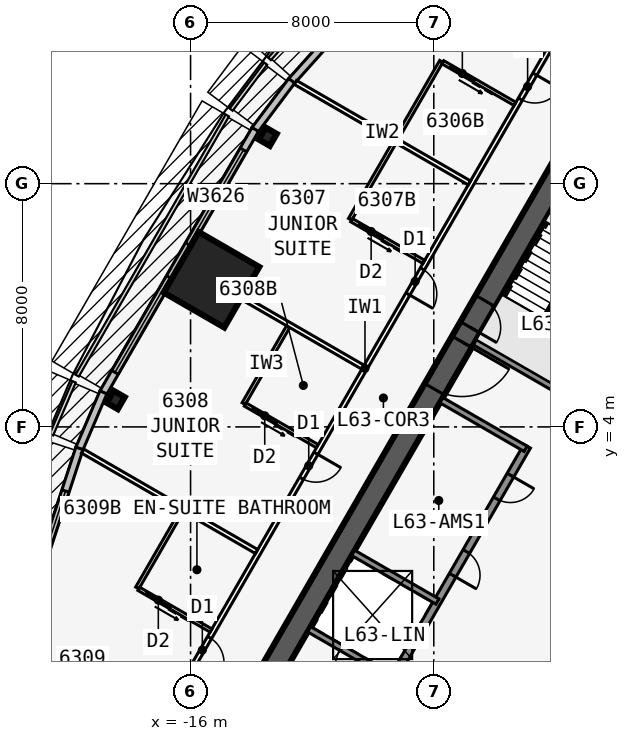
"""IFC4 building model, lengths in metres.
Left out: names, types, materials, properties, quantities, classifications, styles, units other than length and angle.
Written with IfcOpenShell. Run it as: python <this file> out.ifc"""

import sys

from ifc_helpers import new_model, si_unit, direction, frame, frame_2d, origin, origin_2d, place, context, subcontext, project, spatial, rectangle, i_section, extrude, element, fill, save


model = new_model("IFC4")
c1 = context("Model", 3, precision=1e-05, world=origin(), true_north=direction((0.0, 1.0)))
c2 = subcontext(c1, "Body", "Model", "MODEL_VIEW")
j1 = project(units=[si_unit("LENGTHUNIT", "METRE"), si_unit("PLANEANGLEUNIT", "RADIAN")], contexts=[c1])
p1 = place(None, origin())
s1 = spatial("IfcSite", under=j1, at=p1, CompositionType="ELEMENT")
p2 = place(p1, origin())
s2 = spatial("IfcBuilding", under=s1, at=p2, CompositionType="ELEMENT")
p3 = place(p2, frame((0.0, 0.0, 239.3)))
s3 = spatial("IfcBuildingStorey", under=s2, at=p3, CompositionType="ELEMENT", Elevation=239.3)
p4 = place(p3, frame((0.0, 19.052, 0.0), z_axis=(0.0, 0.0, 1.0), x_axis=(-0.499999749417, -0.866025548458, 0.0)))
e1 = element("IfcWall", 1, at=p4, inside=s3, PredefinedType="SHEAR", context=c2, shape_type="SweptSolid", body=[
    extrude(rectangle(XDim=33.0, YDim=0.75, at=frame_2d((16.5, 0.0))), origin(), (0.0, 0.0, 1.0), 3.6),
])
p5 = place(p4, frame((14.15, 0.0, 0.0)))
e2 = element("IfcOpeningElement", 2, at=p5, cuts=e1, PredefinedType="OPENING", context=c2, shape_type="SweptSolid", body=[
    extrude(rectangle(XDim=1.8, YDim=2.13, at=frame_2d((0.9, 1.065))), frame((0.0, 0.385, 0.0), z_axis=(0.0, -1.0, 0.0), x_axis=(1.0, 0.0, 0.0)), (0.0, 0.0, 1.0), 0.77),
])
p6 = place(p4, frame((12.6, 0.0, 0.0)))
e3 = element("IfcOpeningElement", 3, at=p6, cuts=e1, PredefinedType="OPENING", context=c2, shape_type="SweptSolid", body=[
    extrude(rectangle(XDim=1.0, YDim=2.13, at=frame_2d((0.5, 1.065))), frame((0.0, 0.385, 0.0), z_axis=(0.0, -1.0, 0.0), x_axis=(1.0, 0.0, 0.0)), (0.0, 0.0, 1.0), 0.77),
])
p7 = place(p3, frame((-4.929, 3.365, 0.0), z_axis=(0.0, 0.0, 1.0), x_axis=(-0.499991433582, -0.866030349552, 0.0)))
e4 = element("IfcWall", 4, at=p7, inside=s3, PredefinedType="SOLIDWALL", context=c2, shape_type="SweptSolid", body=[
    extrude(rectangle(XDim=10.633, YDim=0.25, at=frame_2d((5.316, 0.0))), origin(), (0.0, 0.0, 1.0), 3.435),
])
p8 = place(p7, frame((9.164, 0.0, 0.0)))
e5 = element("IfcOpeningElement", 5, at=p8, cuts=e4, PredefinedType="OPENING", context=c2, shape_type="SweptSolid", body=[
    extrude(rectangle(XDim=0.9, YDim=2.13, at=frame_2d((0.45, 1.065))), frame((0.0, 0.135, 0.0), z_axis=(0.0, -1.0, 0.0), x_axis=(1.0, 0.0, 0.0)), (0.0, 0.0, 1.0), 0.27),
])
p9 = place(p7, frame((1.1, 0.0, 0.0)))
e6 = element("IfcOpeningElement", 6, at=p9, cuts=e4, PredefinedType="OPENING", context=c2, shape_type="SweptSolid", body=[
    extrude(rectangle(XDim=0.9, YDim=2.13, at=frame_2d((0.45, 1.065))), frame((0.0, 0.135, 0.0), z_axis=(0.0, -1.0, 0.0), x_axis=(1.0, 0.0, 0.0)), (0.0, 0.0, 1.0), 0.27),
])
p10 = place(p7, frame((4.0, 0.0, 0.0)))
e7 = element("IfcOpeningElement", 7, at=p10, cuts=e4, PredefinedType="OPENING", context=c2, shape_type="SweptSolid", body=[
    extrude(rectangle(XDim=0.9, YDim=2.13, at=frame_2d((0.45, 1.065))), frame((0.0, 0.135, 0.0), z_axis=(0.0, -1.0, 0.0), x_axis=(1.0, 0.0, 0.0)), (0.0, 0.0, 1.0), 0.27),
])
for number, where, z_axis, x_axis in (
    (8, (-3.879, 5.184, 0.0), (0.0, 0.0, 1.0), (-0.866, 0.5, 0.0)),
    (9, (-4.979, 3.279, 0.0), (0.0, 0.0, 1.0), (-0.866, 0.5, 0.0)),
    (10, (-7.879, -1.744, 0.0), (0.0, 0.0, 1.0), (-0.866, 0.5, 0.0)),
):
    element("IfcWall", number, at=place(p3, frame(where, z_axis=z_axis, x_axis=x_axis)), inside=s3, PredefinedType="SOLIDWALL", context=c2, shape_type="SweptSolid", body=[
        extrude(rectangle(XDim=3.2, YDim=0.2, at=frame_2d((1.6, 0.0))), origin(), (0.0, 0.0, 1.0), 3.435),
    ])
p11 = place(p3, frame((-9.329, -4.256, 0.0), z_axis=(0.0, 0.0, 1.0), x_axis=(-0.866022944154, 0.50000426018, 0.0)))
e11 = element("IfcWall", 11, at=p11, inside=s3, PredefinedType="SOLIDWALL", context=c2, shape_type="SweptSolid", body=[
    extrude(rectangle(XDim=3.2, YDim=0.2, at=frame_2d((1.6, 0.0))), origin(), (0.0, 0.0, 1.0), 3.435),
])
for number, where, z_axis, x_axis in (
    (12, (-13.461, 13.545, 0.0), (0.0, 0.0, 1.0), (-0.866, 0.5, 0.0)),
    (13, (-18.461, 4.885, 0.0), (0.0, 0.0, 1.0), (-0.866, 0.5, 0.0)),
):
    element("IfcColumn", number, at=place(p3, frame(where, z_axis=z_axis, x_axis=x_axis)), inside=s3, PredefinedType="COLUMN", context=c2, shape_type="SweptSolid", body=[
        extrude(i_section(OverallWidth=0.419, OverallDepth=0.455, WebThickness=0.042, FlangeThickness=0.068, at=origin_2d()), origin(), (0.0, 0.0, 1.0), 3.6),
    ])
p12 = place(p3, frame((-15.312, 8.84, 0.0), z_axis=(0.0, 0.0, 1.0), x_axis=(-0.866025403784, 0.5, 0.0)))
e14 = element("IfcColumn", 14, at=p12, inside=s3, PredefinedType="COLUMN", context=c2, shape_type="SweptSolid", body=[
    extrude(rectangle(XDim=2.3, YDim=2.3, at=origin_2d()), origin(), (0.0, 0.0, 1.0), 3.6),
])
p13 = place(p3, frame((-7.907, 20.701, 0.0), z_axis=(0.0, 0.0, 1.0), x_axis=(-0.667303550892, -0.744785855778, 0.0)))
e15 = element("IfcWall", 15, at=p13, inside=s3, PredefinedType="STANDARD", context=c2, shape_type="SweptSolid", body=[
    extrude(rectangle(XDim=7.153, YDim=0.25, at=frame_2d((3.576, 0.0))), origin(), (0.0, 0.0, 1.0), 3.435),
])
p14 = place(p13, frame((1.476, 0.0, 0.45)))
e16 = element("IfcOpeningElement", 16, at=p14, cuts=e15, PredefinedType="OPENING", context=c2, shape_type="SweptSolid", body=[
    extrude(rectangle(XDim=4.2, YDim=2.6, at=frame_2d((2.1, 1.3))), frame((0.0, 0.135, 0.0), z_axis=(0.0, -1.0, 0.0), x_axis=(1.0, 0.0, 0.0)), (0.0, 0.0, 1.0), 0.27),
])
p15 = place(p3, frame((-12.673, 15.382, 0.0), z_axis=(0.0, 0.0, 1.0), x_axis=(-0.599650843534, -0.800261748335, 0.0)))
e17 = element("IfcWall", 17, at=p15, inside=s3, PredefinedType="STANDARD", context=c2, shape_type="SweptSolid", body=[
    extrude(rectangle(XDim=2.014, YDim=0.25, at=frame_2d((1.007, 0.0))), origin(), (0.0, 0.0, 1.0), 3.435),
])
p16 = place(p3, frame((-13.873, 13.783, 0.0), z_axis=(0.0, 0.0, 1.0), x_axis=(-0.499993662806, -0.866029062534, 0.0)))
e18 = element("IfcWall", 18, at=p16, inside=s3, PredefinedType="STANDARD", context=c2, shape_type="SweptSolid", body=[
    extrude(rectangle(XDim=10.0, YDim=0.25, at=frame_2d((5.0, 0.0))), origin(), (0.0, 0.0, 1.0), 3.435),
])
p17 = place(p16, frame((0.775, 0.0, 0.45)))
e19 = element("IfcOpeningElement", 19, at=p17, cuts=e18, PredefinedType="OPENING", context=c2, shape_type="SweptSolid", body=[
    extrude(rectangle(XDim=3.6, YDim=2.6, at=frame_2d((1.8, 1.3))), frame((0.0, 0.135, 0.0), z_axis=(0.0, -1.0, 0.0), x_axis=(1.0, 0.0, 0.0)), (0.0, 0.0, 1.0), 0.27),
])
p18 = place(p16, frame((5.625, 0.0, 0.45)))
e20 = element("IfcOpeningElement", 20, at=p18, cuts=e18, PredefinedType="OPENING", context=c2, shape_type="SweptSolid", body=[
    extrude(rectangle(XDim=3.6, YDim=2.6, at=frame_2d((1.8, 1.3))), frame((0.0, 0.135, 0.0), z_axis=(0.0, -1.0, 0.0), x_axis=(1.0, 0.0, 0.0)), (0.0, 0.0, 1.0), 0.27),
])
p19 = place(p3, frame((-18.866, 5.136, 0.0), z_axis=(0.0, 0.0, 1.0), x_axis=(-0.393290226175, -0.91941437774, 0.0)))
e21 = element("IfcWall", 21, at=p19, inside=s3, PredefinedType="STANDARD", context=c2, shape_type="SweptSolid", body=[
    extrude(rectangle(XDim=2.014, YDim=0.25, at=frame_2d((1.007, 0.0))), origin(), (0.0, 0.0, 1.0), 3.435),
])
p20 = place(p3, frame((-19.654, 3.294, 0.0), z_axis=(0.0, 0.0, 1.0), x_axis=(-0.311328857048, -0.95030223759, 0.0)))
e22 = element("IfcWall", 22, at=p20, inside=s3, PredefinedType="STANDARD", context=c2, shape_type="SweptSolid", body=[
    extrude(rectangle(XDim=7.153, YDim=0.25, at=frame_2d((3.576, 0.0))), origin(), (0.0, 0.0, 1.0), 3.435),
])
p21 = place(p20, frame((1.476, 0.0, 0.45)))
e23 = element("IfcOpeningElement", 23, at=p21, cuts=e22, PredefinedType="OPENING", context=c2, shape_type="SweptSolid", body=[
    extrude(rectangle(XDim=4.2, YDim=2.6, at=frame_2d((2.1, 1.3))), frame((0.0, 0.135, 0.0), z_axis=(0.0, -1.0, 0.0), x_axis=(1.0, 0.0, 0.0)), (0.0, 0.0, 1.0), 0.27),
])
p22 = place(p3, frame((-0.425, 22.966, 0.0), z_axis=(0.0, 0.0, 1.0), x_axis=(-0.500000265775, -0.866025250339, 0.0)))
e24 = element("IfcWall", 24, at=p22, inside=s3, PredefinedType="PARTITIONING", context=c2, shape_type="SweptSolid", body=[
    extrude(rectangle(XDim=39.354, YDim=0.15, at=frame_2d((19.677, 0.0))), origin(), (0.0, 0.0, 1.0), 3.435),
])
p23 = place(p22, frame((8.502, 0.0, 0.0)))
e25 = element("IfcOpeningElement", 25, at=p23, cuts=e24, PredefinedType="OPENING", context=c2, shape_type="SweptSolid", body=[
    extrude(rectangle(XDim=0.95, YDim=2.13, at=frame_2d((0.475, 1.065))), frame((0.0, 0.085, 0.0), z_axis=(0.0, -1.0, 0.0), x_axis=(1.0, 0.0, 0.0)), (0.0, 0.0, 1.0), 0.17),
])
p24 = place(p22, frame((15.902, 0.0, 0.0)))
e26 = element("IfcOpeningElement", 26, at=p24, cuts=e24, PredefinedType="OPENING", context=c2, shape_type="SweptSolid", body=[
    extrude(rectangle(XDim=0.95, YDim=2.13, at=frame_2d((0.475, 1.065))), frame((0.0, 0.085, 0.0), z_axis=(0.0, -1.0, 0.0), x_axis=(1.0, 0.0, 0.0)), (0.0, 0.0, 1.0), 0.17),
])
p25 = place(p22, frame((22.902, 0.0, 0.0)))
e27 = element("IfcOpeningElement", 27, at=p25, cuts=e24, PredefinedType="OPENING", context=c2, shape_type="SweptSolid", body=[
    extrude(rectangle(XDim=0.95, YDim=2.13, at=frame_2d((0.475, 1.065))), frame((0.0, 0.085, 0.0), z_axis=(0.0, -1.0, 0.0), x_axis=(1.0, 0.0, 0.0)), (0.0, 0.0, 1.0), 0.17),
])
p26 = place(p22, frame((29.902, 0.0, 0.0)))
e28 = element("IfcOpeningElement", 28, at=p26, cuts=e24, PredefinedType="OPENING", context=c2, shape_type="SweptSolid", body=[
    extrude(rectangle(XDim=0.95, YDim=2.13, at=frame_2d((0.475, 1.065))), frame((0.0, 0.085, 0.0), z_axis=(0.0, -1.0, 0.0), x_axis=(1.0, 0.0, 0.0)), (0.0, 0.0, 1.0), 0.17),
])
p27 = place(p3, frame((-6.829, 12.025, 0.0), z_axis=(0.0, 0.0, 1.0), x_axis=(-0.866029323189, 0.499993211332, 0.0)))
e29 = element("IfcWall", 29, at=p27, inside=s3, PredefinedType="PARTITIONING", context=c2, shape_type="SweptSolid", body=[
    extrude(rectangle(XDim=6.608, YDim=0.15, at=frame_2d((3.304, 0.0))), origin(), (0.0, 0.0, 1.0), 2.678),
])
p28 = place(p3, frame((-10.329, 5.963, 0.0), z_axis=(0.0, 0.0, 1.0), x_axis=(-0.866011785882, 0.500023586156, 0.0)))
e30 = element("IfcWall", 30, at=p28, inside=s3, PredefinedType="PARTITIONING", context=c2, shape_type="SweptSolid", body=[
    extrude(rectangle(XDim=6.854, YDim=0.15, at=frame_2d((3.427, 0.0))), origin(), (0.0, 0.0, 1.0), 2.678),
])
p29 = place(p3, frame((-13.829, -0.099, 0.0), z_axis=(0.0, 0.0, 1.0), x_axis=(-0.866022562216, 0.500004921708, 0.0)))
e31 = element("IfcWall", 31, at=p29, inside=s3, PredefinedType="PARTITIONING", context=c2, shape_type="SweptSolid", body=[
    extrude(rectangle(XDim=6.609, YDim=0.15, at=frame_2d((3.304, 0.0))), origin(), (0.0, 0.0, 1.0), 2.678),
])
p30 = place(p3, frame((-7.753, 16.023, 0.0), z_axis=(0.0, 0.0, 1.0), x_axis=(-0.499990139034, -0.866031096941, 0.0)))
e32 = element("IfcWall", 32, at=p30, inside=s3, PredefinedType="PLUMBINGWALL", context=c2, shape_type="SweptSolid", body=[
    extrude(rectangle(XDim=3.0, YDim=0.12, at=frame_2d((1.5, 0.0))), origin(), (0.0, 0.0, 1.0), 3.435),
])
p31 = place(p3, frame((-5.329, 14.623, 0.0), z_axis=(0.0, 0.0, 1.0), x_axis=(-0.865997131366, 0.500048966069, 0.0)))
e33 = element("IfcWall", 33, at=p31, inside=s3, PredefinedType="PLUMBINGWALL", context=c2, shape_type="SweptSolid", body=[
    extrude(rectangle(XDim=2.74, YDim=0.12, at=frame_2d((1.37, 0.0))), origin(), (0.0, 0.0, 1.0), 3.435),
])
p32 = place(p31, frame((1.55, 0.0, 0.0)))
e34 = element("IfcOpeningElement", 34, at=p32, cuts=e33, PredefinedType="OPENING", context=c2, shape_type="SweptSolid", body=[
    extrude(rectangle(XDim=0.9, YDim=2.13, at=frame_2d((0.45, 1.065))), frame((0.0, 0.07, 0.0), z_axis=(0.0, -1.0, 0.0), x_axis=(1.0, 0.0, 0.0)), (0.0, 0.0, 1.0), 0.14),
])
p33 = place(p3, frame((-9.253, 13.425, 0.0), z_axis=(0.0, 0.0, 1.0), x_axis=(-0.499990139034, -0.866031096941, 0.0)))
e35 = element("IfcWall", 35, at=p33, inside=s3, PredefinedType="PLUMBINGWALL", context=c2, shape_type="SweptSolid", body=[
    extrude(rectangle(XDim=3.0, YDim=0.12, at=frame_2d((1.5, 0.0))), origin(), (0.0, 0.0, 1.0), 3.435),
])
p34 = place(p3, frame((-8.329, 9.427, 0.0), z_axis=(0.0, 0.0, 1.0), x_axis=(-0.866035715982, 0.499982138324, 0.0)))
e36 = element("IfcWall", 36, at=p34, inside=s3, PredefinedType="PLUMBINGWALL", context=c2, shape_type="SweptSolid", body=[
    extrude(rectangle(XDim=2.74, YDim=0.12, at=frame_2d((1.37, 0.0))), origin(), (0.0, 0.0, 1.0), 3.435),
])
p35 = place(p34, frame((1.55, 0.0, 0.0)))
e37 = element("IfcOpeningElement", 37, at=p35, cuts=e36, PredefinedType="OPENING", context=c2, shape_type="SweptSolid", body=[
    extrude(rectangle(XDim=0.9, YDim=2.13, at=frame_2d((0.45, 1.065))), frame((0.0, 0.07, 0.0), z_axis=(0.0, -1.0, 0.0), x_axis=(1.0, 0.0, 0.0)), (0.0, 0.0, 1.0), 0.14),
])
p36 = place(p3, frame((-12.753, 7.363, 0.0), z_axis=(0.0, 0.0, 1.0), x_axis=(-0.50002537861, -0.866010750942, 0.0)))
e38 = element("IfcWall", 38, at=p36, inside=s3, PredefinedType="PLUMBINGWALL", context=c2, shape_type="SweptSolid", body=[
    extrude(rectangle(XDim=3.0, YDim=0.12, at=frame_2d((1.5, 0.0))), origin(), (0.0, 0.0, 1.0), 3.435),
])
p37 = place(p3, frame((-11.829, 3.365, 0.0), z_axis=(0.0, 0.0, 1.0), x_axis=(-0.865997131366, 0.500048966069, 0.0)))
e39 = element("IfcWall", 39, at=p37, inside=s3, PredefinedType="PLUMBINGWALL", context=c2, shape_type="SweptSolid", body=[
    extrude(rectangle(XDim=2.74, YDim=0.12, at=frame_2d((1.37, 0.0))), origin(), (0.0, 0.0, 1.0), 3.435),
])
p38 = place(p37, frame((1.55, 0.0, 0.0)))
e40 = element("IfcOpeningElement", 40, at=p38, cuts=e39, PredefinedType="OPENING", context=c2, shape_type="SweptSolid", body=[
    extrude(rectangle(XDim=0.9, YDim=2.13, at=frame_2d((0.45, 1.065))), frame((0.0, 0.07, 0.0), z_axis=(0.0, -1.0, 0.0), x_axis=(1.0, 0.0, 0.0)), (0.0, 0.0, 1.0), 0.14),
])
p39 = place(p3, frame((-16.253, 1.301, 0.0), z_axis=(0.0, 0.0, 1.0), x_axis=(-0.499990139034, -0.866031096941, 0.0)))
e41 = element("IfcWall", 41, at=p39, inside=s3, PredefinedType="PLUMBINGWALL", context=c2, shape_type="SweptSolid", body=[
    extrude(rectangle(XDim=3.0, YDim=0.12, at=frame_2d((1.5, 0.0))), origin(), (0.0, 0.0, 1.0), 3.435),
])
p40 = place(p3, frame((-15.329, -2.697, 0.0), z_axis=(0.0, 0.0, 1.0), x_axis=(-0.866035715982, 0.499982138324, 0.0)))
e42 = element("IfcWall", 42, at=p40, inside=s3, PredefinedType="PLUMBINGWALL", context=c2, shape_type="SweptSolid", body=[
    extrude(rectangle(XDim=2.74, YDim=0.12, at=frame_2d((1.37, 0.0))), origin(), (0.0, 0.0, 1.0), 3.435),
])
p41 = place(p40, frame((1.55, 0.0, 0.0)))
e43 = element("IfcOpeningElement", 43, at=p41, cuts=e42, PredefinedType="OPENING", context=c2, shape_type="SweptSolid", body=[
    extrude(rectangle(XDim=0.9, YDim=2.13, at=frame_2d((0.45, 1.065))), frame((0.0, 0.07, 0.0), z_axis=(0.0, -1.0, 0.0), x_axis=(1.0, 0.0, 0.0)), (0.0, 0.0, 1.0), 0.14),
])
p42 = place(p3, frame((-2.988, 9.978, 0.0), z_axis=(0.0, 0.0, 1.0), x_axis=(-0.499992232847, -0.866029888106, 0.0)))
e44 = element("IfcWall", 44, at=p42, inside=s3, PredefinedType="SOLIDWALL", context=c2, shape_type="SweptSolid", body=[
    extrude(rectangle(XDim=2.794, YDim=0.1, at=frame_2d((1.397, 0.0))), origin(), (0.0, 0.0, 1.0), 3.6),
])
p43 = place(p17, origin())
e45 = element("IfcWindow", 45, at=p43, inside=s3, PartitioningType="SINGLE_PANEL", PredefinedType="WINDOW", context=c2, shape_type="SweptSolid", body=[
    extrude(rectangle(XDim=3.6, YDim=2.6, at=frame_2d((1.8, 1.3))), frame((0.0, 0.03, 0.0), z_axis=(0.0, -1.0, 0.0), x_axis=(1.0, 0.0, 0.0)), (0.0, 0.0, 1.0), 0.06),
])
fill(e19, e45)
p44 = place(p18, origin())
e46 = element("IfcWindow", 46, at=p44, inside=s3, PartitioningType="SINGLE_PANEL", PredefinedType="WINDOW", context=c2, shape_type="SweptSolid", body=[
    extrude(rectangle(XDim=3.6, YDim=2.6, at=frame_2d((1.8, 1.3))), frame((0.0, 0.03, 0.0), z_axis=(0.0, -1.0, 0.0), x_axis=(1.0, 0.0, 0.0)), (0.0, 0.0, 1.0), 0.06),
])
fill(e20, e46)
p45 = place(p21, origin())
e47 = element("IfcWindow", 47, at=p45, inside=s3, PartitioningType="SINGLE_PANEL", PredefinedType="WINDOW", context=c2, shape_type="SweptSolid", body=[
    extrude(rectangle(XDim=4.2, YDim=2.6, at=frame_2d((2.1, 1.3))), frame((0.0, 0.03, 0.0), z_axis=(0.0, -1.0, 0.0), x_axis=(1.0, 0.0, 0.0)), (0.0, 0.0, 1.0), 0.06),
])
fill(e23, e47)
p46 = place(p32, origin())
e48 = element("IfcDoor", 48, at=p46, inside=s3, OperationType="SLIDING_TO_LEFT", PredefinedType="DOOR", context=c2, shape_type="SweptSolid", body=[
    extrude(rectangle(XDim=0.9, YDim=2.13, at=frame_2d((0.45, 1.065))), frame((0.0, 0.025, 0.0), z_axis=(0.0, -1.0, 0.0), x_axis=(1.0, 0.0, 0.0)), (0.0, 0.0, 1.0), 0.05),
])
fill(e34, e48)
p47 = place(p23, origin())
e49 = element("IfcDoor", 49, at=p47, inside=s3, OperationType="SINGLE_SWING_LEFT", PredefinedType="DOOR", context=c2, shape_type="SweptSolid", body=[
    extrude(rectangle(XDim=0.95, YDim=2.13, at=frame_2d((0.475, 1.065))), frame((0.0, 0.025, 0.0), z_axis=(0.0, -1.0, 0.0), x_axis=(1.0, 0.0, 0.0)), (0.0, 0.0, 1.0), 0.05),
])
fill(e25, e49)
p48 = place(p35, origin())
e50 = element("IfcDoor", 50, at=p48, inside=s3, OperationType="SLIDING_TO_LEFT", PredefinedType="DOOR", context=c2, shape_type="SweptSolid", body=[
    extrude(rectangle(XDim=0.9, YDim=2.13, at=frame_2d((0.45, 1.065))), frame((0.0, 0.025, 0.0), z_axis=(0.0, -1.0, 0.0), x_axis=(1.0, 0.0, 0.0)), (0.0, 0.0, 1.0), 0.05),
])
fill(e37, e50)
p49 = place(p24, origin())
e51 = element("IfcDoor", 51, at=p49, inside=s3, OperationType="SINGLE_SWING_RIGHT", PredefinedType="DOOR", context=c2, shape_type="SweptSolid", body=[
    extrude(rectangle(XDim=0.95, YDim=2.13, at=frame_2d((0.475, 1.065))), frame((0.0, 0.025, 0.0), z_axis=(0.0, -1.0, 0.0), x_axis=(1.0, 0.0, 0.0)), (0.0, 0.0, 1.0), 0.05),
])
fill(e26, e51)
p50 = place(p38, origin())
e52 = element("IfcDoor", 52, at=p50, inside=s3, OperationType="SLIDING_TO_LEFT", PredefinedType="DOOR", context=c2, shape_type="SweptSolid", body=[
    extrude(rectangle(XDim=0.9, YDim=2.13, at=frame_2d((0.45, 1.065))), frame((0.0, 0.025, 0.0), z_axis=(0.0, -1.0, 0.0), x_axis=(1.0, 0.0, 0.0)), (0.0, 0.0, 1.0), 0.05),
])
fill(e40, e52)
p51 = place(p25, origin())
e53 = element("IfcDoor", 53, at=p51, inside=s3, OperationType="SINGLE_SWING_LEFT", PredefinedType="DOOR", context=c2, shape_type="SweptSolid", body=[
    extrude(rectangle(XDim=0.95, YDim=2.13, at=frame_2d((0.475, 1.065))), frame((0.0, 0.025, 0.0), z_axis=(0.0, -1.0, 0.0), x_axis=(1.0, 0.0, 0.0)), (0.0, 0.0, 1.0), 0.05),
])
fill(e27, e53)
p52 = place(p41, origin())
e54 = element("IfcDoor", 54, at=p52, inside=s3, OperationType="SLIDING_TO_LEFT", PredefinedType="DOOR", context=c2, shape_type="SweptSolid", body=[
    extrude(rectangle(XDim=0.9, YDim=2.13, at=frame_2d((0.45, 1.065))), frame((0.0, 0.025, 0.0), z_axis=(0.0, -1.0, 0.0), x_axis=(1.0, 0.0, 0.0)), (0.0, 0.0, 1.0), 0.05),
])
fill(e43, e54)
p53 = place(p26, origin())
e55 = element("IfcDoor", 55, at=p53, inside=s3, OperationType="SINGLE_SWING_RIGHT", PredefinedType="DOOR", context=c2, shape_type="SweptSolid", body=[
    extrude(rectangle(XDim=0.95, YDim=2.13, at=frame_2d((0.475, 1.065))), frame((0.0, 0.025, 0.0), z_axis=(0.0, -1.0, 0.0), x_axis=(1.0, 0.0, 0.0)), (0.0, 0.0, 1.0), 0.05),
])
fill(e28, e55)
p54 = place(p5, origin())
e56 = element("IfcDoor", 56, at=p54, inside=s3, OperationType="DOUBLE_DOOR_SINGLE_SWING", PredefinedType="DOOR", context=c2, shape_type="SweptSolid", body=[
    extrude(rectangle(XDim=1.8, YDim=2.13, at=frame_2d((0.9, 1.065))), frame((0.0, 0.025, 0.0), z_axis=(0.0, -1.0, 0.0), x_axis=(1.0, 0.0, 0.0)), (0.0, 0.0, 1.0), 0.05),
])
fill(e2, e56)
p55 = place(p6, origin())
e57 = element("IfcDoor", 57, at=p55, inside=s3, OperationType="SINGLE_SWING_RIGHT", PredefinedType="DOOR", context=c2, shape_type="SweptSolid", body=[
    extrude(rectangle(XDim=1.0, YDim=2.13, at=frame_2d((0.5, 1.065))), frame((0.0, 0.025, 0.0), z_axis=(0.0, -1.0, 0.0), x_axis=(1.0, 0.0, 0.0)), (0.0, 0.0, 1.0), 0.05),
])
fill(e3, e57)
p56 = place(p9, origin())
e58 = element("IfcDoor", 58, at=p56, inside=s3, OperationType="SINGLE_SWING_LEFT", PredefinedType="DOOR", context=c2, shape_type="SweptSolid", body=[
    extrude(rectangle(XDim=0.9, YDim=2.13, at=frame_2d((0.45, 1.065))), frame((0.0, 0.025, 0.0), z_axis=(0.0, -1.0, 0.0), x_axis=(1.0, 0.0, 0.0)), (0.0, 0.0, 1.0), 0.05),
])
fill(e6, e58)
p57 = place(p10, origin())
e59 = element("IfcDoor", 59, at=p57, inside=s3, OperationType="SINGLE_SWING_RIGHT", PredefinedType="DOOR", context=c2, shape_type="SweptSolid", body=[
    extrude(rectangle(XDim=0.9, YDim=2.13, at=frame_2d((0.45, 1.065))), frame((0.0, 0.025, 0.0), z_axis=(0.0, -1.0, 0.0), x_axis=(1.0, 0.0, 0.0)), (0.0, 0.0, 1.0), 0.05),
])
fill(e7, e59)
save(model, sys.argv[1])
